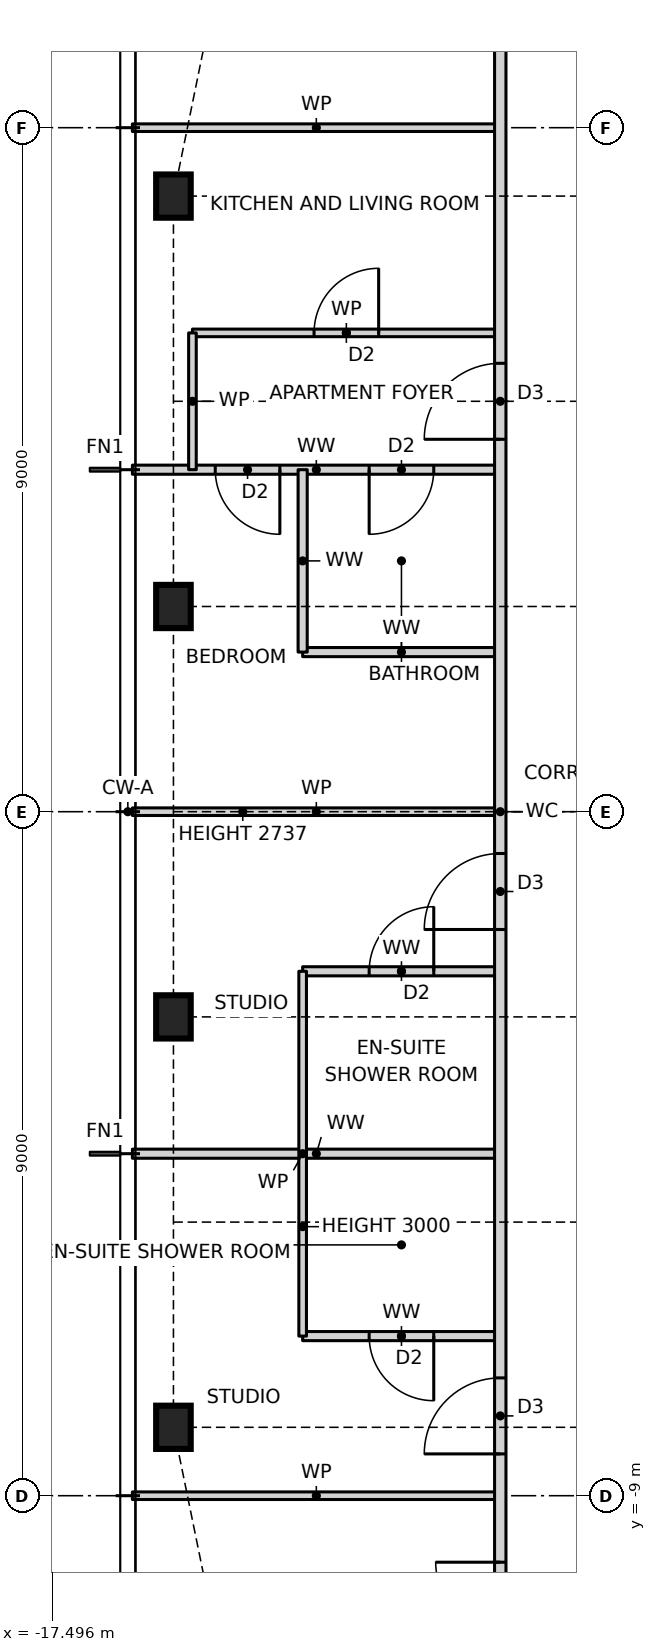
"""IFC4 building model, lengths in metres.
Left out: names, types, materials, properties, quantities, classifications, styles, units other than length and angle.
Written with IfcOpenShell. Run it as: python <this file> out.ifc"""

import sys

from ifc_helpers import new_model, si_unit, direction, frame, frame_2d, origin, origin_2d, place, context, subcontext, project, spatial, rectangle, i_section, extrude, element, fill, save


model = new_model("IFC4")
c1 = context("Model", 3, precision=1e-05, world=origin(), true_north=direction((0.0, 1.0)))
c2 = subcontext(c1, "Body", "Model", "MODEL_VIEW")
j1 = project(units=[si_unit("LENGTHUNIT", "METRE"), si_unit("PLANEANGLEUNIT", "RADIAN")], contexts=[c1])
p1 = place(None, origin())
s1 = spatial("IfcSite", under=j1, at=p1, CompositionType="ELEMENT")
p2 = place(p1, origin())
s2 = spatial("IfcBuilding", under=s1, at=p2, CompositionType="ELEMENT")
p3 = place(p2, frame((0.0, 0.0, 225.5)))
s3 = spatial("IfcBuildingStorey", under=s2, at=p3, CompositionType="ELEMENT", Elevation=225.5)
for number, where, z_axis, x_axis in (
    (1, (-15.9, 8.1, 0.0), (0.0, 0.0, 1.0), (1.0, 0.0, 0.0)),
    (2, (-15.9, 2.7, 0.0), (0.0, 0.0, 1.0), (1.0, 0.0, 0.0)),
    (3, (-15.9, -2.7, 0.0), (0.0, 0.0, 1.0), (1.0, 0.0, 0.0)),
    (4, (-15.9, -8.1, 0.0), (0.0, 0.0, 1.0), (1.0, 0.0, 0.0)),
):
    element("IfcColumn", number, at=place(p3, frame(where, z_axis=z_axis, x_axis=x_axis)), inside=s3, PredefinedType="COLUMN", context=c2, shape_type="SweptSolid", body=[
        extrude(i_section(OverallWidth=0.455, OverallDepth=0.569, WebThickness=0.078, FlangeThickness=0.125, at=origin_2d()), origin(), (0.0, 0.0, 1.0), 3.5),
    ])
p4 = place(p3, frame((-16.44, -9.0, 0.0), z_axis=(0.0, 0.0, 1.0), x_axis=(1.0, 0.0, 0.0)))
e5 = element("IfcWall", 5, at=p4, inside=s3, PredefinedType="PARTITIONING", context=c2, shape_type="SweptSolid", body=[
    extrude(rectangle(XDim=4.84, YDim=0.1, at=frame_2d((2.42, 0.0))), origin(), (0.0, 0.0, 1.0), 3.27),
])
p5 = place(p3, frame((-14.2, -6.9, 0.0), z_axis=(0.0, 0.0, 1.0), x_axis=(1.0, 0.0, 0.0)))
e6 = element("IfcWall", 6, at=p5, inside=s3, PredefinedType="PARTITIONING", context=c2, shape_type="SweptSolid", body=[
    extrude(rectangle(XDim=2.6, YDim=0.12, at=frame_2d((1.3, 0.0))), origin(), (0.0, 0.0, 1.0), 3.27),
])
p6 = place(p5, frame((0.875, 0.0, 0.0)))
e7 = element("IfcOpeningElement", 7, at=p6, cuts=e6, PredefinedType="OPENING", context=c2, shape_type="SweptSolid", body=[
    extrude(rectangle(XDim=0.85, YDim=2.1, at=frame_2d((0.425, 1.05))), frame((0.0, 0.07, 0.0), z_axis=(0.0, -1.0, 0.0), x_axis=(1.0, 0.0, 0.0)), (0.0, 0.0, 1.0), 0.14),
])
p7 = place(p3, frame((-16.44, -4.5, 0.0), z_axis=(0.0, 0.0, 1.0), x_axis=(1.0, 0.0, 0.0)))
e8 = element("IfcWall", 8, at=p7, inside=s3, PredefinedType="PARTITIONING", context=c2, shape_type="SweptSolid", body=[
    extrude(rectangle(XDim=4.84, YDim=0.12, at=frame_2d((2.42, 0.0))), origin(), (0.0, 0.0, 1.0), 3.27),
])
p8 = place(p3, frame((-14.2, -2.1, 0.0), z_axis=(0.0, 0.0, 1.0), x_axis=(1.0, 0.0, 0.0)))
e9 = element("IfcWall", 9, at=p8, inside=s3, PredefinedType="PARTITIONING", context=c2, shape_type="SweptSolid", body=[
    extrude(rectangle(XDim=2.6, YDim=0.12, at=frame_2d((1.3, 0.0))), origin(), (0.0, 0.0, 1.0), 3.27),
])
p9 = place(p8, frame((0.875, 0.0, 0.0)))
e10 = element("IfcOpeningElement", 10, at=p9, cuts=e9, PredefinedType="OPENING", context=c2, shape_type="SweptSolid", body=[
    extrude(rectangle(XDim=0.85, YDim=2.1, at=frame_2d((0.425, 1.05))), frame((0.0, 0.07, 0.0), z_axis=(0.0, -1.0, 0.0), x_axis=(1.0, 0.0, 0.0)), (0.0, 0.0, 1.0), 0.14),
])
p10 = place(p3, frame((-16.44, 0.0, 0.0), z_axis=(0.0, 0.0, 1.0), x_axis=(1.0, 0.0, 0.0)))
e11 = element("IfcWall", 11, at=p10, inside=s3, PredefinedType="PARTITIONING", context=c2, shape_type="SweptSolid", body=[
    extrude(rectangle(XDim=4.84, YDim=0.1, at=frame_2d((2.42, 0.0))), origin(), (0.0, 0.0, 1.0), 2.737),
])
p11 = place(p3, frame((-14.2, 2.1, 0.0), z_axis=(0.0, 0.0, 1.0), x_axis=(1.0, 0.0, 0.0)))
e12 = element("IfcWall", 12, at=p11, inside=s3, PredefinedType="PARTITIONING", context=c2, shape_type="SweptSolid", body=[
    extrude(rectangle(XDim=2.6, YDim=0.12, at=frame_2d((1.3, 0.0))), origin(), (0.0, 0.0, 1.0), 3.27),
])
p12 = place(p3, frame((-16.44, 4.5, 0.0), z_axis=(0.0, 0.0, 1.0), x_axis=(1.0, 0.0, 0.0)))
e13 = element("IfcWall", 13, at=p12, inside=s3, PredefinedType="PARTITIONING", context=c2, shape_type="SweptSolid", body=[
    extrude(rectangle(XDim=4.84, YDim=0.12, at=frame_2d((2.42, 0.0))), origin(), (0.0, 0.0, 1.0), 3.27),
])
p13 = place(p12, frame((1.09, 0.0, 0.0)))
e14 = element("IfcOpeningElement", 14, at=p13, cuts=e13, PredefinedType="OPENING", context=c2, shape_type="SweptSolid", body=[
    extrude(rectangle(XDim=0.85, YDim=2.1, at=frame_2d((0.425, 1.05))), frame((0.0, 0.07, 0.0), z_axis=(0.0, -1.0, 0.0), x_axis=(1.0, 0.0, 0.0)), (0.0, 0.0, 1.0), 0.14),
])
p14 = place(p12, frame((3.115, 0.0, 0.0)))
e15 = element("IfcOpeningElement", 15, at=p14, cuts=e13, PredefinedType="OPENING", context=c2, shape_type="SweptSolid", body=[
    extrude(rectangle(XDim=0.85, YDim=2.1, at=frame_2d((0.425, 1.05))), frame((0.0, 0.07, 0.0), z_axis=(0.0, -1.0, 0.0), x_axis=(1.0, 0.0, 0.0)), (0.0, 0.0, 1.0), 0.14),
])
p15 = place(p3, frame((-15.65, 6.3, 0.0), z_axis=(0.0, 0.0, 1.0), x_axis=(1.0, 0.0, 0.0)))
e16 = element("IfcWall", 16, at=p15, inside=s3, PredefinedType="PARTITIONING", context=c2, shape_type="SweptSolid", body=[
    extrude(rectangle(XDim=4.05, YDim=0.1, at=frame_2d((2.025, 0.0))), origin(), (0.0, 0.0, 1.0), 3.27),
])
p16 = place(p15, frame((1.6, 0.0, 0.0)))
e17 = element("IfcOpeningElement", 17, at=p16, cuts=e16, PredefinedType="OPENING", context=c2, shape_type="SweptSolid", body=[
    extrude(rectangle(XDim=0.85, YDim=2.1, at=frame_2d((0.425, 1.05))), frame((0.0, 0.06, 0.0), z_axis=(0.0, -1.0, 0.0), x_axis=(1.0, 0.0, 0.0)), (0.0, 0.0, 1.0), 0.12),
])
p17 = place(p3, frame((-16.44, 9.0, 0.0), z_axis=(0.0, 0.0, 1.0), x_axis=(1.0, 0.0, 0.0)))
e18 = element("IfcWall", 18, at=p17, inside=s3, PredefinedType="PARTITIONING", context=c2, shape_type="SweptSolid", body=[
    extrude(rectangle(XDim=4.84, YDim=0.1, at=frame_2d((2.42, 0.0))), origin(), (0.0, 0.0, 1.0), 3.27),
])
p18 = place(p3, frame((-11.6, -11.6, 0.0), z_axis=(0.0, 0.0, 1.0), x_axis=(0.0, 1.0, 0.0)))
e19 = element("IfcWall", 19, at=p18, inside=s3, PredefinedType="PARTITIONING", context=c2, shape_type="SweptSolid", body=[
    extrude(rectangle(XDim=23.2, YDim=0.15, at=frame_2d((11.6, 0.0))), origin(), (0.0, 0.0, 1.0), 3.27),
])
p19 = place(p18, frame((16.5, 0.0, 0.0)))
e20 = element("IfcOpeningElement", 20, at=p19, cuts=e19, PredefinedType="OPENING", context=c2, shape_type="SweptSolid", body=[
    extrude(rectangle(XDim=1.0, YDim=2.1, at=frame_2d((0.5, 1.05))), frame((0.0, 0.085, 0.0), z_axis=(0.0, -1.0, 0.0), x_axis=(1.0, 0.0, 0.0)), (0.0, 0.0, 1.0), 0.17),
])
p20 = place(p18, frame((10.05, 0.0, 0.0)))
e21 = element("IfcOpeningElement", 21, at=p20, cuts=e19, PredefinedType="OPENING", context=c2, shape_type="SweptSolid", body=[
    extrude(rectangle(XDim=1.0, YDim=2.1, at=frame_2d((0.5, 1.05))), frame((0.0, 0.085, 0.0), z_axis=(0.0, -1.0, 0.0), x_axis=(1.0, 0.0, 0.0)), (0.0, 0.0, 1.0), 0.17),
])
p21 = place(p18, frame((3.15, 0.0, 0.0)))
e22 = element("IfcOpeningElement", 22, at=p21, cuts=e19, PredefinedType="OPENING", context=c2, shape_type="SweptSolid", body=[
    extrude(rectangle(XDim=1.0, YDim=2.1, at=frame_2d((0.5, 1.05))), frame((0.0, 0.085, 0.0), z_axis=(0.0, -1.0, 0.0), x_axis=(1.0, 0.0, 0.0)), (0.0, 0.0, 1.0), 0.17),
])
p22 = place(p18, frame((0.875, 0.0, 0.0)))
e23 = element("IfcOpeningElement", 23, at=p22, cuts=e19, PredefinedType="OPENING", context=c2, shape_type="SweptSolid", body=[
    extrude(rectangle(XDim=0.85, YDim=2.1, at=frame_2d((0.425, 1.05))), frame((0.0, 0.085, 0.0), z_axis=(0.0, -1.0, 0.0), x_axis=(1.0, 0.0, 0.0)), (0.0, 0.0, 1.0), 0.17),
])
p23 = place(p3, frame((-14.2, -6.9, 0.0), z_axis=(0.0, 0.0, 1.0), x_axis=(0.0, 1.0, 0.0)))
e24 = element("IfcWall", 24, at=p23, inside=s3, PredefinedType="PARTITIONING", context=c2, shape_type="SweptSolid", body=[
    extrude(rectangle(XDim=4.8, YDim=0.1, at=frame_2d((2.4, 0.0))), origin(), (0.0, 0.0, 1.0), 3.0),
])
p24 = place(p3, frame((-14.2, 2.1, 0.0), z_axis=(0.0, 0.0, 1.0), x_axis=(0.0, 1.0, 0.0)))
e25 = element("IfcWall", 25, at=p24, inside=s3, PredefinedType="PARTITIONING", context=c2, shape_type="SweptSolid", body=[
    extrude(rectangle(XDim=2.4, YDim=0.12, at=frame_2d((1.2, 0.0))), origin(), (0.0, 0.0, 1.0), 3.27),
])
p25 = place(p3, frame((-15.65, 4.5, 0.0), z_axis=(0.0, 0.0, 1.0), x_axis=(0.0, 1.0, 0.0)))
e26 = element("IfcWall", 26, at=p25, inside=s3, PredefinedType="PARTITIONING", context=c2, shape_type="SweptSolid", body=[
    extrude(rectangle(XDim=1.8, YDim=0.1, at=frame_2d((0.9, 0.0))), origin(), (0.0, 0.0, 1.0), 3.27),
])
p26 = place(p19, origin())
e27 = element("IfcDoor", 27, at=p26, inside=s3, OperationType="SINGLE_SWING_LEFT", PredefinedType="DOOR", context=c2, shape_type="SweptSolid", body=[
    extrude(rectangle(XDim=1.0, YDim=2.1, at=frame_2d((0.5, 1.05))), frame((0.0, 0.025, 0.0), z_axis=(0.0, -1.0, 0.0), x_axis=(1.0, 0.0, 0.0)), (0.0, 0.0, 1.0), 0.05),
])
fill(e20, e27)
p27 = place(p16, origin())
e28 = element("IfcDoor", 28, at=p27, inside=s3, OperationType="SINGLE_SWING_RIGHT", PredefinedType="DOOR", context=c2, shape_type="SweptSolid", body=[
    extrude(rectangle(XDim=0.85, YDim=2.1, at=frame_2d((0.425, 1.05))), frame((0.0, 0.025, 0.0), z_axis=(0.0, -1.0, 0.0), x_axis=(1.0, 0.0, 0.0)), (0.0, 0.0, 1.0), 0.05),
])
fill(e17, e28)
p28 = place(p13, frame((0.85, 0.0, 0.0), z_axis=(0.0, 0.0, 1.0), x_axis=(-1.0, 0.0, 0.0)))
e29 = element("IfcDoor", 29, at=p28, inside=s3, OperationType="SINGLE_SWING_LEFT", PredefinedType="DOOR", context=c2, shape_type="SweptSolid", body=[
    extrude(rectangle(XDim=0.85, YDim=2.1, at=frame_2d((0.425, 1.05))), frame((0.0, 0.025, 0.0), z_axis=(0.0, -1.0, 0.0), x_axis=(1.0, 0.0, 0.0)), (0.0, 0.0, 1.0), 0.05),
])
fill(e14, e29)
p29 = place(p14, frame((0.85, 0.0, 0.0), z_axis=(0.0, 0.0, 1.0), x_axis=(-1.0, 0.0, 0.0)))
e30 = element("IfcDoor", 30, at=p29, inside=s3, OperationType="SINGLE_SWING_RIGHT", PredefinedType="DOOR", context=c2, shape_type="SweptSolid", body=[
    extrude(rectangle(XDim=0.85, YDim=2.1, at=frame_2d((0.425, 1.05))), frame((0.0, 0.025, 0.0), z_axis=(0.0, -1.0, 0.0), x_axis=(1.0, 0.0, 0.0)), (0.0, 0.0, 1.0), 0.05),
])
fill(e15, e30)
p30 = place(p20, origin())
e31 = element("IfcDoor", 31, at=p30, inside=s3, OperationType="SINGLE_SWING_LEFT", PredefinedType="DOOR", context=c2, shape_type="SweptSolid", body=[
    extrude(rectangle(XDim=1.0, YDim=2.1, at=frame_2d((0.5, 1.05))), frame((0.0, 0.025, 0.0), z_axis=(0.0, -1.0, 0.0), x_axis=(1.0, 0.0, 0.0)), (0.0, 0.0, 1.0), 0.05),
])
fill(e21, e31)
p31 = place(p9, origin())
e32 = element("IfcDoor", 32, at=p31, inside=s3, OperationType="SINGLE_SWING_RIGHT", PredefinedType="DOOR", context=c2, shape_type="SweptSolid", body=[
    extrude(rectangle(XDim=0.85, YDim=2.1, at=frame_2d((0.425, 1.05))), frame((0.0, 0.025, 0.0), z_axis=(0.0, -1.0, 0.0), x_axis=(1.0, 0.0, 0.0)), (0.0, 0.0, 1.0), 0.05),
])
fill(e10, e32)
p32 = place(p21, origin())
e33 = element("IfcDoor", 33, at=p32, inside=s3, OperationType="SINGLE_SWING_LEFT", PredefinedType="DOOR", context=c2, shape_type="SweptSolid", body=[
    extrude(rectangle(XDim=1.0, YDim=2.1, at=frame_2d((0.5, 1.05))), frame((0.0, 0.025, 0.0), z_axis=(0.0, -1.0, 0.0), x_axis=(1.0, 0.0, 0.0)), (0.0, 0.0, 1.0), 0.05),
])
fill(e22, e33)
p33 = place(p6, frame((0.85, 0.0, 0.0), z_axis=(0.0, 0.0, 1.0), x_axis=(-1.0, 0.0, 0.0)))
e34 = element("IfcDoor", 34, at=p33, inside=s3, OperationType="SINGLE_SWING_LEFT", PredefinedType="DOOR", context=c2, shape_type="SweptSolid", body=[
    extrude(rectangle(XDim=0.85, YDim=2.1, at=frame_2d((0.425, 1.05))), frame((0.0, 0.025, 0.0), z_axis=(0.0, -1.0, 0.0), x_axis=(1.0, 0.0, 0.0)), (0.0, 0.0, 1.0), 0.05),
])
fill(e7, e34)
p34 = place(p22, origin())
e35 = element("IfcDoor", 35, at=p34, inside=s3, OperationType="SINGLE_SWING_RIGHT", PredefinedType="DOOR", context=c2, shape_type="SweptSolid", body=[
    extrude(rectangle(XDim=0.85, YDim=2.1, at=frame_2d((0.425, 1.05))), frame((0.0, 0.025, 0.0), z_axis=(0.0, -1.0, 0.0), x_axis=(1.0, 0.0, 0.0)), (0.0, 0.0, 1.0), 0.05),
])
fill(e23, e35)
save(model, sys.argv[1])
